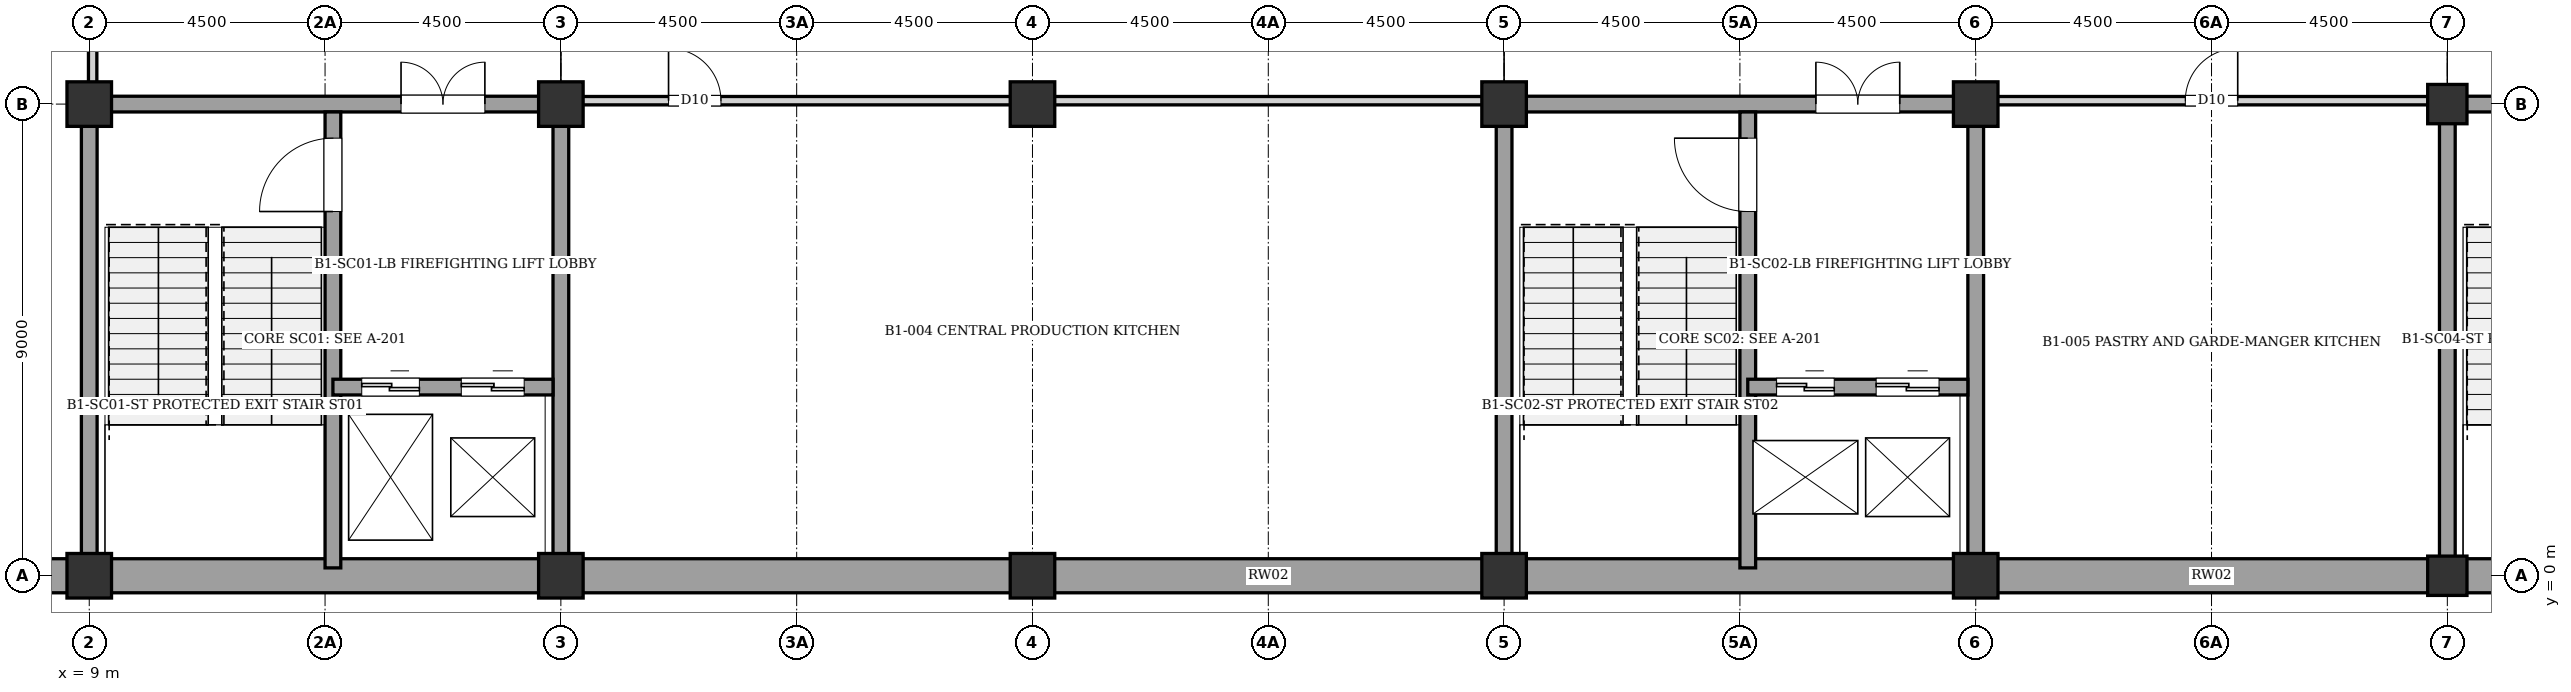
"""IFC4 building model, lengths in metres.
Left out: names, types, materials, properties, quantities, classifications, styles, units other than length and angle.
Written with IfcOpenShell. Run it as: python <this file> out.ifc"""

import sys

from ifc_helpers import new_model, si_unit, direction, frame, frame_2d, origin, origin_2d, place, context, subcontext, project, spatial, rectangle, extrude, element, fill, save


model = new_model("IFC4")
c1 = context("Model", 3, precision=1e-05, world=origin(), true_north=direction((0.0, 1.0)))
c2 = subcontext(c1, "Body", "Model", "MODEL_VIEW")
j1 = project(units=[si_unit("LENGTHUNIT", "METRE"), si_unit("PLANEANGLEUNIT", "RADIAN")], contexts=[c1])
p1 = place(None, origin())
s1 = spatial("IfcSite", under=j1, at=p1, CompositionType="ELEMENT")
p2 = place(p1, origin())
s2 = spatial("IfcBuilding", under=s1, at=p2, CompositionType="ELEMENT")
p3 = place(p2, frame((0.0, 0.0, -4.48)))
s3 = spatial("IfcBuildingStorey", under=s2, at=p3, CompositionType="ELEMENT", Elevation=-4.48)
for number, where, z_axis, x_axis in (
    (1, (9.0, 0.0, 0.0), (0.0, 0.0, 1.0), (1.0, 0.0, 0.0)),
    (2, (9.0, 9.0, 0.0), (0.0, 0.0, 1.0), (1.0, 0.0, 0.0)),
    (3, (18.0, 0.0, 0.0), (0.0, 0.0, 1.0), (1.0, 0.0, 0.0)),
    (4, (18.0, 9.0, 0.0), (0.0, 0.0, 1.0), (1.0, 0.0, 0.0)),
    (5, (27.0, 0.0, 0.0), (0.0, 0.0, 1.0), (1.0, 0.0, 0.0)),
    (6, (27.0, 9.0, 0.0), (0.0, 0.0, 1.0), (1.0, 0.0, 0.0)),
    (7, (36.0, 0.0, 0.0), (0.0, 0.0, 1.0), (1.0, 0.0, 0.0)),
    (8, (36.0, 9.0, 0.0), (0.0, 0.0, 1.0), (1.0, 0.0, 0.0)),
    (9, (45.0, 0.0, 0.0), (0.0, 0.0, 1.0), (1.0, 0.0, 0.0)),
    (10, (45.0, 9.0, 0.0), (0.0, 0.0, 1.0), (1.0, 0.0, 0.0)),
):
    element("IfcColumn", number, at=place(p3, frame(where, z_axis=z_axis, x_axis=x_axis)), inside=s3, PredefinedType="COLUMN", context=c2, shape_type="SweptSolid", body=[
        extrude(rectangle(XDim=0.85, YDim=0.85, at=origin_2d()), origin(), (0.0, 0.0, 1.0), 4.48),
    ])
for number, where, z_axis, x_axis in (
    (11, (54.0, 0.0, 0.0), (0.0, 0.0, 1.0), (1.0, 0.0, 0.0)),
    (12, (54.0, 9.0, 0.0), (0.0, 0.0, 1.0), (1.0, 0.0, 0.0)),
):
    element("IfcColumn", number, at=place(p3, frame(where, z_axis=z_axis, x_axis=x_axis)), inside=s3, PredefinedType="COLUMN", context=c2, shape_type="SweptSolid", body=[
        extrude(rectangle(XDim=0.75, YDim=0.75, at=origin_2d()), origin(), (0.0, 0.0, 1.0), 4.48),
    ])
for number, where, z_axis, x_axis in (
    (13, (63.0, 0.0, 0.0), (0.0, 0.0, 1.0), (-1.0, 0.0, 0.0)),
    (14, (54.0, 0.0, 0.0), (0.0, 0.0, 1.0), (-1.0, 0.0, 0.0)),
    (15, (45.0, 0.0, 0.0), (0.0, 0.0, 1.0), (-1.0, 0.0, 0.0)),
    (16, (36.0, 0.0, 0.0), (0.0, 0.0, 1.0), (-1.0, 0.0, 0.0)),
    (17, (27.0, 0.0, 0.0), (0.0, 0.0, 1.0), (-1.0, 0.0, 0.0)),
    (18, (18.0, 0.0, 0.0), (0.0, 0.0, 1.0), (-1.0, 0.0, 0.0)),
    (19, (9.0, 0.0, 0.0), (0.0, 0.0, 1.0), (-1.0, 0.0, 0.0)),
):
    element("IfcWall", number, at=place(p3, frame(where, z_axis=z_axis, x_axis=x_axis)), inside=s3, PredefinedType="USERDEFINED", context=c2, shape_type="SweptSolid", body=[
        extrude(rectangle(XDim=9.0, YDim=0.65, at=frame_2d((4.5, 0.0))), origin(), (0.0, 0.0, 1.0), 4.22),
    ])
p4 = place(p3, frame((18.0, 0.0, 0.0), z_axis=(0.0, 0.0, 1.0), x_axis=(0.0, 1.0, 0.0)))
e20 = element("IfcWall", 20, at=p4, inside=s3, PredefinedType="SHEAR", context=c2, shape_type="SweptSolid", body=[
    extrude(rectangle(XDim=9.0, YDim=0.3, at=frame_2d((4.5, 0.0))), origin(), (0.0, 0.0, 1.0), 4.22),
])
p5 = place(p3, frame((9.0, 9.0, 0.0), z_axis=(0.0, 0.0, 1.0), x_axis=(1.0, 0.0, 0.0)))
e21 = element("IfcWall", 21, at=p5, inside=s3, PredefinedType="SHEAR", context=c2, shape_type="SweptSolid", body=[
    extrude(rectangle(XDim=9.0, YDim=0.3, at=frame_2d((4.5, 0.0))), origin(), (0.0, 0.0, 1.0), 4.22),
])
p6 = place(p5, frame((5.95, 0.0, 0.0)))
e22 = element("IfcOpeningElement", 22, at=p6, cuts=e21, PredefinedType="OPENING", context=c2, shape_type="SweptSolid", body=[
    extrude(rectangle(XDim=1.6, YDim=2.1, at=frame_2d((0.8, 1.05))), frame((0.0, 0.16, 0.0), z_axis=(0.0, -1.0, 0.0), x_axis=(1.0, 0.0, 0.0)), (0.0, 0.0, 1.0), 0.32),
])
p7 = place(p3, frame((9.0, 0.0, 0.0), z_axis=(0.0, 0.0, 1.0), x_axis=(0.0, 1.0, 0.0)))
e23 = element("IfcWall", 23, at=p7, inside=s3, PredefinedType="SHEAR", context=c2, shape_type="SweptSolid", body=[
    extrude(rectangle(XDim=9.0, YDim=0.3, at=frame_2d((4.5, 0.0))), origin(), (0.0, 0.0, 1.0), 4.22),
])
p8 = place(p3, frame((13.65, 0.15, 0.0), z_axis=(0.0, 0.0, 1.0), x_axis=(0.0, 1.0, 0.0)))
e24 = element("IfcWall", 24, at=p8, inside=s3, PredefinedType="SHEAR", context=c2, shape_type="SweptSolid", body=[
    extrude(rectangle(XDim=8.7, YDim=0.3, at=frame_2d((4.35, 0.0))), origin(), (0.0, 0.0, 1.0), 4.22),
])
p9 = place(p8, frame((6.8, 0.0, 0.0)))
e25 = element("IfcOpeningElement", 25, at=p9, cuts=e24, PredefinedType="OPENING", context=c2, shape_type="SweptSolid", body=[
    extrude(rectangle(XDim=1.4, YDim=2.02, at=frame_2d((0.7, 1.01))), frame((0.0, 0.16, 0.0), z_axis=(0.0, -1.0, 0.0), x_axis=(1.0, 0.0, 0.0)), (0.0, 0.0, 1.0), 0.32),
])
p10 = place(p3, frame((13.65, 3.6, 0.0), z_axis=(0.0, 0.0, 1.0), x_axis=(1.0, 0.0, 0.0)))
e26 = element("IfcWall", 26, at=p10, inside=s3, PredefinedType="SHEAR", context=c2, shape_type="SweptSolid", body=[
    extrude(rectangle(XDim=4.2, YDim=0.3, at=frame_2d((2.1, 0.0))), origin(), (0.0, 0.0, 1.0), 4.22),
])
p11 = place(p10, frame((0.55, 0.0, 0.0)))
e27 = element("IfcOpeningElement", 27, at=p11, cuts=e26, PredefinedType="OPENING", context=c2, shape_type="SweptSolid", body=[
    extrude(rectangle(XDim=1.1, YDim=2.1, at=frame_2d((0.55, 1.05))), frame((0.0, 0.16, 0.0), z_axis=(0.0, -1.0, 0.0), x_axis=(1.0, 0.0, 0.0)), (0.0, 0.0, 1.0), 0.32),
])
p12 = place(p10, frame((2.45, 0.0, 0.0)))
e28 = element("IfcOpeningElement", 28, at=p12, cuts=e26, PredefinedType="OPENING", context=c2, shape_type="SweptSolid", body=[
    extrude(rectangle(XDim=1.2, YDim=2.2, at=frame_2d((0.6, 1.1))), frame((0.0, 0.16, 0.0), z_axis=(0.0, -1.0, 0.0), x_axis=(1.0, 0.0, 0.0)), (0.0, 0.0, 1.0), 0.32),
])
p13 = place(p3, frame((45.0, 0.0, 0.0), z_axis=(0.0, 0.0, 1.0), x_axis=(0.0, 1.0, 0.0)))
e29 = element("IfcWall", 29, at=p13, inside=s3, PredefinedType="SHEAR", context=c2, shape_type="SweptSolid", body=[
    extrude(rectangle(XDim=9.0, YDim=0.3, at=frame_2d((4.5, 0.0))), origin(), (0.0, 0.0, 1.0), 4.22),
])
p14 = place(p3, frame((36.0, 9.0, 0.0), z_axis=(0.0, 0.0, 1.0), x_axis=(1.0, 0.0, 0.0)))
e30 = element("IfcWall", 30, at=p14, inside=s3, PredefinedType="SHEAR", context=c2, shape_type="SweptSolid", body=[
    extrude(rectangle(XDim=9.0, YDim=0.3, at=frame_2d((4.5, 0.0))), origin(), (0.0, 0.0, 1.0), 4.22),
])
p15 = place(p14, frame((5.95, 0.0, 0.0)))
e31 = element("IfcOpeningElement", 31, at=p15, cuts=e30, PredefinedType="OPENING", context=c2, shape_type="SweptSolid", body=[
    extrude(rectangle(XDim=1.6, YDim=2.1, at=frame_2d((0.8, 1.05))), frame((0.0, 0.16, 0.0), z_axis=(0.0, -1.0, 0.0), x_axis=(1.0, 0.0, 0.0)), (0.0, 0.0, 1.0), 0.32),
])
p16 = place(p3, frame((36.0, 0.0, 0.0), z_axis=(0.0, 0.0, 1.0), x_axis=(0.0, 1.0, 0.0)))
e32 = element("IfcWall", 32, at=p16, inside=s3, PredefinedType="SHEAR", context=c2, shape_type="SweptSolid", body=[
    extrude(rectangle(XDim=9.0, YDim=0.3, at=frame_2d((4.5, 0.0))), origin(), (0.0, 0.0, 1.0), 4.22),
])
p17 = place(p3, frame((40.65, 0.15, 0.0), z_axis=(0.0, 0.0, 1.0), x_axis=(0.0, 1.0, 0.0)))
e33 = element("IfcWall", 33, at=p17, inside=s3, PredefinedType="SHEAR", context=c2, shape_type="SweptSolid", body=[
    extrude(rectangle(XDim=8.7, YDim=0.3, at=frame_2d((4.35, 0.0))), origin(), (0.0, 0.0, 1.0), 4.22),
])
p18 = place(p17, frame((6.8, 0.0, 0.0)))
e34 = element("IfcOpeningElement", 34, at=p18, cuts=e33, PredefinedType="OPENING", context=c2, shape_type="SweptSolid", body=[
    extrude(rectangle(XDim=1.4, YDim=2.02, at=frame_2d((0.7, 1.01))), frame((0.0, 0.16, 0.0), z_axis=(0.0, -1.0, 0.0), x_axis=(1.0, 0.0, 0.0)), (0.0, 0.0, 1.0), 0.32),
])
p19 = place(p3, frame((40.65, 3.6, 0.0), z_axis=(0.0, 0.0, 1.0), x_axis=(1.0, 0.0, 0.0)))
e35 = element("IfcWall", 35, at=p19, inside=s3, PredefinedType="SHEAR", context=c2, shape_type="SweptSolid", body=[
    extrude(rectangle(XDim=4.2, YDim=0.3, at=frame_2d((2.1, 0.0))), origin(), (0.0, 0.0, 1.0), 4.22),
])
p20 = place(p19, frame((0.55, 0.0, 0.0)))
e36 = element("IfcOpeningElement", 36, at=p20, cuts=e35, PredefinedType="OPENING", context=c2, shape_type="SweptSolid", body=[
    extrude(rectangle(XDim=1.1, YDim=2.1, at=frame_2d((0.55, 1.05))), frame((0.0, 0.16, 0.0), z_axis=(0.0, -1.0, 0.0), x_axis=(1.0, 0.0, 0.0)), (0.0, 0.0, 1.0), 0.32),
])
p21 = place(p19, frame((2.45, 0.0, 0.0)))
e37 = element("IfcOpeningElement", 37, at=p21, cuts=e35, PredefinedType="OPENING", context=c2, shape_type="SweptSolid", body=[
    extrude(rectangle(XDim=1.2, YDim=2.2, at=frame_2d((0.6, 1.1))), frame((0.0, 0.16, 0.0), z_axis=(0.0, -1.0, 0.0), x_axis=(1.0, 0.0, 0.0)), (0.0, 0.0, 1.0), 0.32),
])
p22 = place(p3, frame((54.0, 9.0, 0.0), z_axis=(0.0, 0.0, 1.0), x_axis=(1.0, 0.0, 0.0)))
e38 = element("IfcWall", 38, at=p22, inside=s3, PredefinedType="SHEAR", context=c2, shape_type="SweptSolid", body=[
    extrude(rectangle(XDim=9.0, YDim=0.3, at=frame_2d((4.5, 0.0))), origin(), (0.0, 0.0, 1.0), 4.22),
])
p23 = place(p22, frame((6.05, 0.0, 0.0)))
e39 = element("IfcOpeningElement", 39, at=p23, cuts=e38, PredefinedType="OPENING", context=c2, shape_type="SweptSolid", body=[
    extrude(rectangle(XDim=1.4, YDim=2.02, at=frame_2d((0.7, 1.01))), frame((0.0, 0.16, 0.0), z_axis=(0.0, -1.0, 0.0), x_axis=(1.0, 0.0, 0.0)), (0.0, 0.0, 1.0), 0.32),
])
p24 = place(p3, frame((54.0, 0.0, 0.0), z_axis=(0.0, 0.0, 1.0), x_axis=(0.0, 1.0, 0.0)))
e40 = element("IfcWall", 40, at=p24, inside=s3, PredefinedType="SHEAR", context=c2, shape_type="SweptSolid", body=[
    extrude(rectangle(XDim=9.0, YDim=0.3, at=frame_2d((4.5, 0.0))), origin(), (0.0, 0.0, 1.0), 4.22),
])
p25 = place(p3, frame((9.065, 9.155, 0.0), z_axis=(0.0, 0.0, 1.0), x_axis=(0.0, 1.0, 0.0)))
e41 = element("IfcWall", 41, at=p25, inside=s3, PredefinedType="PARTITIONING", context=c2, shape_type="SweptSolid", body=[
    extrude(rectangle(XDim=2.775, YDim=0.16, at=frame_2d((1.387, 0.0))), origin(), (0.0, 0.0, 1.0), 3.32),
])
p26 = place(p3, frame((18.155, 9.065, 0.0), z_axis=(0.0, 0.0, 1.0), x_axis=(1.0, 0.0, 0.0)))
e42 = element("IfcWall", 42, at=p26, inside=s3, PredefinedType="PARTITIONING", context=c2, shape_type="SweptSolid", body=[
    extrude(rectangle(XDim=17.69, YDim=0.16, at=frame_2d((8.845, 0.0))), origin(), (0.0, 0.0, 1.0), 3.32),
])
p27 = place(p26, frame((1.9, 0.0, 0.0)))
e43 = element("IfcOpeningElement", 43, at=p27, cuts=e42, PredefinedType="OPENING", context=c2, shape_type="SweptSolid", body=[
    extrude(rectangle(XDim=1.0, YDim=2.1, at=frame_2d((0.5, 1.05))), frame((0.0, 0.09, 0.0), z_axis=(0.0, -1.0, 0.0), x_axis=(1.0, 0.0, 0.0)), (0.0, 0.0, 1.0), 0.18),
])
p28 = place(p3, frame((45.155, 9.065, 0.0), z_axis=(0.0, 0.0, 1.0), x_axis=(1.0, 0.0, 0.0)))
e44 = element("IfcWall", 44, at=p28, inside=s3, PredefinedType="PARTITIONING", context=c2, shape_type="SweptSolid", body=[
    extrude(rectangle(XDim=8.69, YDim=0.16, at=frame_2d((4.345, 0.0))), origin(), (0.0, 0.0, 1.0), 3.32),
])
p29 = place(p28, frame((3.845, 0.0, 0.0)))
e45 = element("IfcOpeningElement", 45, at=p29, cuts=e44, PredefinedType="OPENING", context=c2, shape_type="SweptSolid", body=[
    extrude(rectangle(XDim=1.0, YDim=2.1, at=frame_2d((0.5, 1.05))), frame((0.0, 0.09, 0.0), z_axis=(0.0, -1.0, 0.0), x_axis=(1.0, 0.0, 0.0)), (0.0, 0.0, 1.0), 0.18),
])
p30 = place(p6, origin())
e46 = element("IfcDoor", 46, at=p30, inside=s3, OperationType="DOUBLE_DOOR_SINGLE_SWING", PredefinedType="DOOR", context=c2, shape_type="SweptSolid", body=[
    extrude(rectangle(XDim=1.6, YDim=2.1, at=frame_2d((0.8, 1.05))), frame((0.0, 0.025, 0.0), z_axis=(0.0, -1.0, 0.0), x_axis=(1.0, 0.0, 0.0)), (0.0, 0.0, 1.0), 0.05),
])
fill(e22, e46)
p31 = place(p9, origin())
e47 = element("IfcDoor", 47, at=p31, inside=s3, OperationType="SINGLE_SWING_LEFT", PredefinedType="DOOR", context=c2, shape_type="SweptSolid", body=[
    extrude(rectangle(XDim=1.4, YDim=2.02, at=frame_2d((0.7, 1.01))), frame((0.0, 0.025, 0.0), z_axis=(0.0, -1.0, 0.0), x_axis=(1.0, 0.0, 0.0)), (0.0, 0.0, 1.0), 0.05),
])
fill(e25, e47)
p32 = place(p11, origin())
e48 = element("IfcDoor", 48, at=p32, inside=s3, OperationType="DOUBLE_DOOR_SLIDING", PredefinedType="DOOR", context=c2, shape_type="SweptSolid", body=[
    extrude(rectangle(XDim=1.1, YDim=2.1, at=frame_2d((0.55, 1.05))), frame((0.0, 0.025, 0.0), z_axis=(0.0, -1.0, 0.0), x_axis=(1.0, 0.0, 0.0)), (0.0, 0.0, 1.0), 0.05),
])
fill(e27, e48)
p33 = place(p12, origin())
e49 = element("IfcDoor", 49, at=p33, inside=s3, OperationType="DOUBLE_DOOR_SLIDING", PredefinedType="DOOR", context=c2, shape_type="SweptSolid", body=[
    extrude(rectangle(XDim=1.2, YDim=2.2, at=frame_2d((0.6, 1.1))), frame((0.0, 0.025, 0.0), z_axis=(0.0, -1.0, 0.0), x_axis=(1.0, 0.0, 0.0)), (0.0, 0.0, 1.0), 0.05),
])
fill(e28, e49)
p34 = place(p15, origin())
e50 = element("IfcDoor", 50, at=p34, inside=s3, OperationType="DOUBLE_DOOR_SINGLE_SWING", PredefinedType="DOOR", context=c2, shape_type="SweptSolid", body=[
    extrude(rectangle(XDim=1.6, YDim=2.1, at=frame_2d((0.8, 1.05))), frame((0.0, 0.025, 0.0), z_axis=(0.0, -1.0, 0.0), x_axis=(1.0, 0.0, 0.0)), (0.0, 0.0, 1.0), 0.05),
])
fill(e31, e50)
p35 = place(p18, origin())
e51 = element("IfcDoor", 51, at=p35, inside=s3, OperationType="SINGLE_SWING_RIGHT", PredefinedType="DOOR", context=c2, shape_type="SweptSolid", body=[
    extrude(rectangle(XDim=1.4, YDim=2.02, at=frame_2d((0.7, 1.01))), frame((0.0, 0.025, 0.0), z_axis=(0.0, -1.0, 0.0), x_axis=(1.0, 0.0, 0.0)), (0.0, 0.0, 1.0), 0.05),
])
fill(e34, e51)
p36 = place(p20, origin())
e52 = element("IfcDoor", 52, at=p36, inside=s3, OperationType="DOUBLE_DOOR_SLIDING", PredefinedType="DOOR", context=c2, shape_type="SweptSolid", body=[
    extrude(rectangle(XDim=1.1, YDim=2.1, at=frame_2d((0.55, 1.05))), frame((0.0, 0.025, 0.0), z_axis=(0.0, -1.0, 0.0), x_axis=(1.0, 0.0, 0.0)), (0.0, 0.0, 1.0), 0.05),
])
fill(e36, e52)
p37 = place(p21, origin())
e53 = element("IfcDoor", 53, at=p37, inside=s3, OperationType="DOUBLE_DOOR_SLIDING", PredefinedType="DOOR", context=c2, shape_type="SweptSolid", body=[
    extrude(rectangle(XDim=1.2, YDim=2.2, at=frame_2d((0.6, 1.1))), frame((0.0, 0.025, 0.0), z_axis=(0.0, -1.0, 0.0), x_axis=(1.0, 0.0, 0.0)), (0.0, 0.0, 1.0), 0.05),
])
fill(e37, e53)
p38 = place(p27, origin())
e54 = element("IfcDoor", 54, at=p38, inside=s3, OperationType="SINGLE_SWING_LEFT", PredefinedType="DOOR", context=c2, shape_type="SweptSolid", body=[
    extrude(rectangle(XDim=1.0, YDim=2.1, at=frame_2d((0.5, 1.05))), frame((0.0, 0.025, 0.0), z_axis=(0.0, -1.0, 0.0), x_axis=(1.0, 0.0, 0.0)), (0.0, 0.0, 1.0), 0.05),
])
fill(e43, e54)
p39 = place(p29, origin())
e55 = element("IfcDoor", 55, at=p39, inside=s3, OperationType="SINGLE_SWING_RIGHT", PredefinedType="DOOR", context=c2, shape_type="SweptSolid", body=[
    extrude(rectangle(XDim=1.0, YDim=2.1, at=frame_2d((0.5, 1.05))), frame((0.0, 0.025, 0.0), z_axis=(0.0, -1.0, 0.0), x_axis=(1.0, 0.0, 0.0)), (0.0, 0.0, 1.0), 0.05),
])
fill(e45, e55)
save(model, sys.argv[1])
